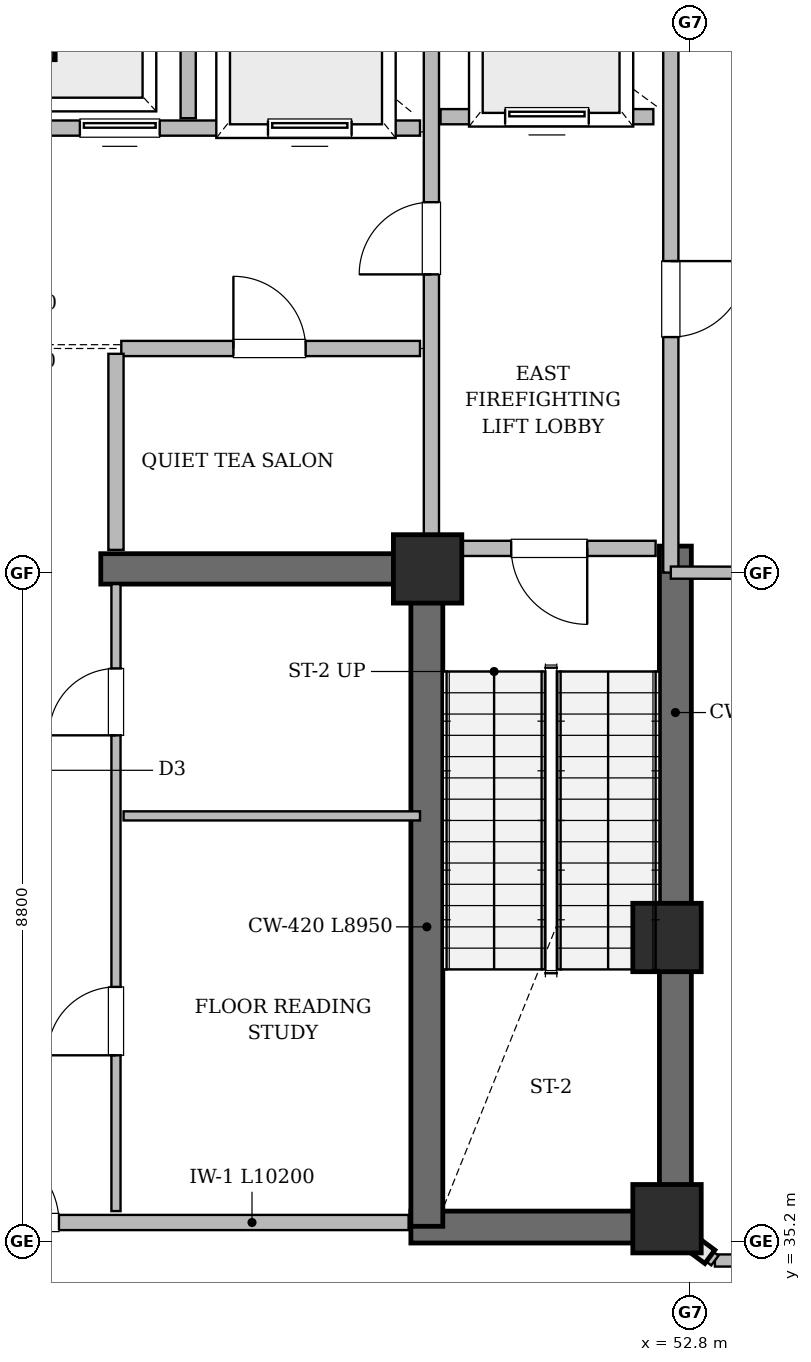
"""IFC4 building model, lengths in metres.
Left out: names, types, materials, properties, quantities, classifications, styles, units other than length and angle.
Written with IfcOpenShell. Run it as: python <this file> out.ifc"""

import sys

from ifc_helpers import new_model, si_unit, direction, frame, frame_2d, origin, origin_2d, place, context, subcontext, project, spatial, rectangle, extrude, element, fill, save


model = new_model("IFC4")
c1 = context("Model", 3, precision=1e-05, world=origin(), true_north=direction((0.0, 1.0)))
c2 = subcontext(c1, "Body", "Model", "MODEL_VIEW")
j1 = project(units=[si_unit("LENGTHUNIT", "METRE"), si_unit("PLANEANGLEUNIT", "RADIAN")], contexts=[c1])
p1 = place(None, origin())
s1 = spatial("IfcSite", under=j1, at=p1, CompositionType="ELEMENT")
p2 = place(p1, origin())
s2 = spatial("IfcBuilding", under=s1, at=p2, CompositionType="ELEMENT")
p3 = place(p2, frame((0.0, 0.0, 295.4)))
s3 = spatial("IfcBuildingStorey", under=s2, at=p3, CompositionType="ELEMENT", Elevation=295.4)
p4 = place(p3, frame((49.13, 35.39, 0.0), z_axis=(0.0, 0.0, 1.0), x_axis=(1.0, 0.0, 0.0)))
e1 = element("IfcWall", 1, at=p4, inside=s3, PredefinedType="SHEAR", context=c2, shape_type="SweptSolid", body=[
    extrude(rectangle(XDim=3.69, YDim=0.42, at=frame_2d((1.845, 0.0))), origin(), (0.0, 0.0, 1.0), 5.14),
])
p5 = place(p3, frame((52.61, 35.18, 0.0), z_axis=(0.0, 0.0, 1.0), x_axis=(0.0, 1.0, 0.0)))
e2 = element("IfcWall", 2, at=p5, inside=s3, PredefinedType="SHEAR", context=c2, shape_type="SweptSolid", body=[
    extrude(rectangle(XDim=9.17, YDim=0.42, at=frame_2d((4.585, 0.0))), origin(), (0.0, 0.0, 1.0), 5.14),
])
p6 = place(p3, frame((49.34, 35.4, 0.0), z_axis=(0.0, 0.0, 1.0), x_axis=(0.0, 1.0, 0.0)))
e3 = element("IfcWall", 3, at=p6, inside=s3, PredefinedType="SHEAR", context=c2, shape_type="SweptSolid", body=[
    extrude(rectangle(XDim=8.95, YDim=0.42, at=frame_2d((4.475, 0.0))), origin(), (0.0, 0.0, 1.0), 5.14),
])
p7 = place(p3, frame((45.05, 44.05, 0.0), z_axis=(0.0, 0.0, 1.0), x_axis=(1.0, 0.0, 0.0)))
e4 = element("IfcWall", 4, at=p7, inside=s3, PredefinedType="SHEAR", context=c2, shape_type="SweptSolid", body=[
    extrude(rectangle(XDim=4.2, YDim=0.4, at=frame_2d((2.1, 0.0))), origin(), (0.0, 0.0, 1.0), 5.14),
])
for number, where, z_axis, x_axis in (
    (5, (52.5, 35.5, 0.0), (0.0, 0.0, 1.0), (1.0, 0.0, 0.0)),
    (6, (52.5, 39.2, 0.0), (0.0, 0.0, 1.0), (1.0, 0.0, 0.0)),
    (7, (49.35, 44.05, 0.0), (0.0, 0.0, 1.0), (1.0, 0.0, 0.0)),
    (8, (44.0, 51.2, 0.0), (0.0, 0.0, 1.0), (1.0, 0.0, 0.0)),
):
    element("IfcColumn", number, at=place(p3, frame(where, z_axis=z_axis, x_axis=x_axis)), inside=s3, PredefinedType="COLUMN", context=c2, shape_type="SweptSolid", body=[
        extrude(rectangle(XDim=0.9, YDim=0.9, at=origin_2d()), origin(), (0.0, 0.0, 1.0), 5.4),
    ])
p8 = place(p3, frame((38.9, 35.45, 0.0), z_axis=(0.0, 0.0, 1.0), x_axis=(1.0, 0.0, 0.0)))
e9 = element("IfcWall", 9, at=p8, inside=s3, PredefinedType="SOLIDWALL", context=c2, shape_type="SweptSolid", body=[
    extrude(rectangle(XDim=10.2, YDim=0.2, at=frame_2d((5.1, 0.0))), origin(), (0.0, 0.0, 1.0), 5.14),
])
p9 = place(p8, frame((4.6, 0.0, 0.0)))
e10 = element("IfcOpeningElement", 10, at=p9, cuts=e9, PredefinedType="OPENING", context=c2, shape_type="SweptSolid", body=[
    extrude(rectangle(XDim=1.0, YDim=2.15, at=frame_2d((0.5, 1.075))), frame((0.0, 0.11, 0.0), z_axis=(0.0, -1.0, 0.0), x_axis=(1.0, 0.0, 0.0)), (0.0, 0.0, 1.0), 0.22),
])
p10 = place(p3, frame((52.55, 44.001, 0.0), z_axis=(0.0, 0.0, 1.0), x_axis=(0.0, 1.0, 0.0)))
e11 = element("IfcWall", 11, at=p10, inside=s3, PredefinedType="SOLIDWALL", context=c2, shape_type="SweptSolid", body=[
    extrude(rectangle(XDim=8.419, YDim=0.2, at=frame_2d((4.209, 0.0))), origin(), (0.0, 0.0, 1.0), 5.14),
])
p11 = place(p10, frame((3.099, 0.0, 0.0)))
e12 = element("IfcOpeningElement", 12, at=p11, cuts=e11, PredefinedType="OPENING", context=c2, shape_type="SweptSolid", body=[
    extrude(rectangle(XDim=1.0, YDim=2.15, at=frame_2d((0.5, 1.075))), frame((0.0, 0.11, 0.0), z_axis=(0.0, -1.0, 0.0), x_axis=(1.0, 0.0, 0.0)), (0.0, 0.0, 1.0), 0.22),
])
p12 = place(p3, frame((45.25, 35.6, 0.0), z_axis=(0.0, 0.0, 1.0), x_axis=(0.0, 1.0, 0.0)))
e13 = element("IfcWall", 13, at=p12, inside=s3, PredefinedType="PARTITIONING", context=c2, shape_type="SweptSolid", body=[
    extrude(rectangle(XDim=8.25, YDim=0.12, at=frame_2d((4.125, 0.0))), origin(), (0.0, 0.0, 1.0), 5.14),
])
p13 = place(p12, frame((2.05, 0.0, 0.0)))
e14 = element("IfcOpeningElement", 14, at=p13, cuts=e13, PredefinedType="OPENING", context=c2, shape_type="SweptSolid", body=[
    extrude(rectangle(XDim=0.9, YDim=2.1, at=frame_2d((0.45, 1.05))), frame((0.0, 0.07, 0.0), z_axis=(0.0, -1.0, 0.0), x_axis=(1.0, 0.0, 0.0)), (0.0, 0.0, 1.0), 0.14),
])
p14 = place(p12, frame((6.26, 0.0, 0.0)))
e15 = element("IfcOpeningElement", 15, at=p14, cuts=e13, PredefinedType="OPENING", context=c2, shape_type="SweptSolid", body=[
    extrude(rectangle(XDim=0.88, YDim=2.1, at=frame_2d((0.44, 1.05))), frame((0.0, 0.07, 0.0), z_axis=(0.0, -1.0, 0.0), x_axis=(1.0, 0.0, 0.0)), (0.0, 0.0, 1.0), 0.14),
])
p15 = place(p3, frame((49.4, 44.5, 0.0), z_axis=(0.0, 0.0, 1.0), x_axis=(0.0, 1.0, 0.0)))
e16 = element("IfcWall", 16, at=p15, inside=s3, PredefinedType="SOLIDWALL", context=c2, shape_type="SweptSolid", body=[
    extrude(rectangle(XDim=7.92, YDim=0.2, at=frame_2d((3.96, 0.0))), origin(), (0.0, 0.0, 1.0), 4.228),
])
p16 = place(p15, frame((3.425, 0.0, 0.0)))
e17 = element("IfcOpeningElement", 17, at=p16, cuts=e16, PredefinedType="OPENING", context=c2, shape_type="SweptSolid", body=[
    extrude(rectangle(XDim=0.95, YDim=2.15, at=frame_2d((0.475, 1.075))), frame((0.0, 0.11, 0.0), z_axis=(0.0, -1.0, 0.0), x_axis=(1.0, 0.0, 0.0)), (0.0, 0.0, 1.0), 0.22),
])
p17 = place(p3, frame((44.25, 49.85, 0.0), z_axis=(0.0, 0.0, 1.0), x_axis=(1.0, 0.0, 0.0)))
e18 = element("IfcWall", 18, at=p17, inside=s3, PredefinedType="SOLIDWALL", context=c2, shape_type="SweptSolid", body=[
    extrude(rectangle(XDim=5.0, YDim=0.2, at=frame_2d((2.5, 0.0))), origin(), (0.0, 0.0, 1.0), 4.228),
])
p18 = place(p17, frame((0.525, 0.0, 0.0)))
e19 = element("IfcOpeningElement", 19, at=p18, cuts=e18, PredefinedType="OPENING", context=c2, shape_type="SweptSolid", body=[
    extrude(rectangle(XDim=1.05, YDim=2.15, at=frame_2d((0.525, 1.075))), frame((0.0, 0.11, 0.0), z_axis=(0.0, -1.0, 0.0), x_axis=(1.0, 0.0, 0.0)), (0.0, 0.0, 1.0), 0.22),
])
p19 = place(p17, frame((3.0, 0.0, 0.0)))
e20 = element("IfcOpeningElement", 20, at=p19, cuts=e18, PredefinedType="OPENING", context=c2, shape_type="SweptSolid", body=[
    extrude(rectangle(XDim=1.1, YDim=2.15, at=frame_2d((0.55, 1.075))), frame((0.0, 0.11, 0.0), z_axis=(0.0, -1.0, 0.0), x_axis=(1.0, 0.0, 0.0)), (0.0, 0.0, 1.0), 0.22),
])
p20 = place(p3, frame((45.32, 46.95, 0.0), z_axis=(0.0, 0.0, 1.0), x_axis=(1.0, 0.0, 0.0)))
e21 = element("IfcWall", 21, at=p20, inside=s3, PredefinedType="SOLIDWALL", context=c2, shape_type="SweptSolid", body=[
    extrude(rectangle(XDim=3.93, YDim=0.2, at=frame_2d((1.965, 0.0))), origin(), (0.0, 0.0, 1.0), 4.228),
])
p21 = place(p20, frame((1.475, 0.0, 0.0)))
e22 = element("IfcOpeningElement", 22, at=p21, cuts=e21, PredefinedType="OPENING", context=c2, shape_type="SweptSolid", body=[
    extrude(rectangle(XDim=0.95, YDim=2.1, at=frame_2d((0.475, 1.05))), frame((0.0, 0.11, 0.0), z_axis=(0.0, -1.0, 0.0), x_axis=(1.0, 0.0, 0.0)), (0.0, 0.0, 1.0), 0.22),
])
p22 = place(p3, frame((49.55, 44.32, 0.0), z_axis=(0.0, 0.0, 1.0), x_axis=(1.0, 0.0, 0.0)))
e23 = element("IfcWall", 23, at=p22, inside=s3, PredefinedType="SOLIDWALL", context=c2, shape_type="SweptSolid", body=[
    extrude(rectangle(XDim=2.8, YDim=0.2, at=frame_2d((1.4, 0.0))), origin(), (0.0, 0.0, 1.0), 4.228),
])
p23 = place(p22, frame((0.9, 0.0, 0.0)))
e24 = element("IfcOpeningElement", 24, at=p23, cuts=e23, PredefinedType="OPENING", context=c2, shape_type="SweptSolid", body=[
    extrude(rectangle(XDim=1.0, YDim=2.15, at=frame_2d((0.5, 1.075))), frame((0.0, 0.11, 0.0), z_axis=(0.0, -1.0, 0.0), x_axis=(1.0, 0.0, 0.0)), (0.0, 0.0, 1.0), 0.22),
])
p24 = place(p3, frame((49.52, 50.0, 0.0), z_axis=(0.0, 0.0, 1.0), x_axis=(1.0, 0.0, 0.0)))
e25 = element("IfcWall", 25, at=p24, inside=s3, PredefinedType="SOLIDWALL", context=c2, shape_type="SweptSolid", body=[
    extrude(rectangle(XDim=2.8, YDim=0.2, at=frame_2d((1.4, 0.0))), origin(), (0.0, 0.0, 1.0), 5.14),
])
p25 = place(p24, frame((0.85, 0.0, 0.0)))
e26 = element("IfcOpeningElement", 26, at=p25, cuts=e25, PredefinedType="OPENING", context=c2, shape_type="SweptSolid", body=[
    extrude(rectangle(XDim=1.1, YDim=2.15, at=frame_2d((0.55, 1.075))), frame((0.0, 0.11, 0.0), z_axis=(0.0, -1.0, 0.0), x_axis=(1.0, 0.0, 0.0)), (0.0, 0.0, 1.0), 0.22),
])
p26 = place(p3, frame((60.335, 43.985, 0.0), z_axis=(0.0, 0.0, 1.0), x_axis=(-0.999997857952, 0.002069804579, 0.0)))
e27 = element("IfcWall", 27, at=p26, inside=s3, PredefinedType="SOLIDWALL", context=c2, shape_type="SweptSolid", body=[
    extrude(rectangle(XDim=7.785, YDim=0.16, at=frame_2d((3.893, 0.0))), origin(), (0.0, 0.0, 1.0), 4.54),
])
p27 = place(p3, frame((45.35, 40.8, 0.0), z_axis=(0.0, 0.0, 1.0), x_axis=(1.0, 0.0, 0.0)))
e28 = element("IfcWall", 28, at=p27, inside=s3, PredefinedType="PARTITIONING", context=c2, shape_type="SweptSolid", body=[
    extrude(rectangle(XDim=3.9, YDim=0.12, at=frame_2d((1.95, 0.0))), origin(), (0.0, 0.0, 1.0), 5.14),
])
p28 = place(p3, frame((45.25, 44.3, 0.0), z_axis=(0.0, 0.0, 1.0), x_axis=(0.0, 1.0, 0.0)))
e29 = element("IfcWall", 29, at=p28, inside=s3, PredefinedType="SOLIDWALL", context=c2, shape_type="SweptSolid", body=[
    extrude(rectangle(XDim=2.58, YDim=0.2, at=frame_2d((1.29, 0.0))), origin(), (0.0, 0.0, 1.0), 5.14),
])
p29 = place(p3, frame((46.2, 49.98, 0.0), z_axis=(0.0, 0.0, 1.0), x_axis=(0.0, 1.0, 0.0)))
e30 = element("IfcWall", 30, at=p29, inside=s3, PredefinedType="SOLIDWALL", context=c2, shape_type="SweptSolid", body=[
    extrude(rectangle(XDim=2.37, YDim=0.2, at=frame_2d((1.185, 0.0))), origin(), (0.0, 0.0, 1.0), 5.14),
])
p30 = place(p3, frame((54.52, 34.95, 0.0), z_axis=(0.0, 0.0, 1.0), x_axis=(-1.0, 0.0, 0.0)))
e31 = element("IfcWall", 31, at=p30, inside=s3, PredefinedType="SOLIDWALL", context=c2, shape_type="SweptSolid", body=[
    extrude(rectangle(XDim=1.39, YDim=0.16, at=frame_2d((0.695, 0.0))), origin(), (0.0, 0.0, 1.0), 4.54),
])
p31 = place(p3, frame((53.13, 34.95, 0.0), z_axis=(0.0, 0.0, 1.0), x_axis=(-0.802951496235, 0.596044373092, 0.0)))
e32 = element("IfcWall", 32, at=p31, inside=s3, PredefinedType="SOLIDWALL", context=c2, shape_type="SweptSolid", body=[
    extrude(rectangle(XDim=0.386, YDim=0.16, at=frame_2d((0.193, 0.0))), origin(), (0.0, 0.0, 1.0), 5.14),
])
p32 = place(p23, frame((1.0, 0.0, 0.0), z_axis=(0.0, 0.0, 1.0), x_axis=(-1.0, 0.0, 0.0)))
e33 = element("IfcDoor", 33, at=p32, inside=s3, OperationType="SINGLE_SWING_RIGHT", PredefinedType="DOOR", context=c2, shape_type="SweptSolid", body=[
    extrude(rectangle(XDim=1.0, YDim=2.15, at=frame_2d((0.5, 1.075))), frame((0.0, 0.025, 0.0), z_axis=(0.0, -1.0, 0.0), x_axis=(1.0, 0.0, 0.0)), (0.0, 0.0, 1.0), 0.05),
])
fill(e24, e33)
p33 = place(p11, frame((1.0, 0.0, 0.0), z_axis=(0.0, 0.0, 1.0), x_axis=(-1.0, 0.0, 0.0)))
e34 = element("IfcDoor", 34, at=p33, inside=s3, OperationType="SINGLE_SWING_RIGHT", PredefinedType="DOOR", context=c2, shape_type="SweptSolid", body=[
    extrude(rectangle(XDim=1.0, YDim=2.15, at=frame_2d((0.5, 1.075))), frame((0.0, 0.025, 0.0), z_axis=(0.0, -1.0, 0.0), x_axis=(1.0, 0.0, 0.0)), (0.0, 0.0, 1.0), 0.05),
])
fill(e12, e34)
p34 = place(p16, origin())
e35 = element("IfcDoor", 35, at=p34, inside=s3, OperationType="SINGLE_SWING_LEFT", PredefinedType="DOOR", context=c2, shape_type="SweptSolid", body=[
    extrude(rectangle(XDim=0.95, YDim=2.15, at=frame_2d((0.475, 1.075))), frame((0.0, 0.025, 0.0), z_axis=(0.0, -1.0, 0.0), x_axis=(1.0, 0.0, 0.0)), (0.0, 0.0, 1.0), 0.05),
])
fill(e17, e35)
p35 = place(p25, origin())
e36 = element("IfcDoor", 36, at=p35, inside=s3, OperationType="SLIDING_TO_LEFT", PredefinedType="DOOR", context=c2, shape_type="SweptSolid", body=[
    extrude(rectangle(XDim=1.1, YDim=2.15, at=frame_2d((0.55, 1.075))), frame((0.0, 0.025, 0.0), z_axis=(0.0, -1.0, 0.0), x_axis=(1.0, 0.0, 0.0)), (0.0, 0.0, 1.0), 0.05),
])
fill(e26, e36)
p36 = place(p9, origin())
e37 = element("IfcDoor", 37, at=p36, inside=s3, OperationType="SINGLE_SWING_LEFT", PredefinedType="DOOR", context=c2, shape_type="SweptSolid", body=[
    extrude(rectangle(XDim=1.0, YDim=2.15, at=frame_2d((0.5, 1.075))), frame((0.0, 0.025, 0.0), z_axis=(0.0, -1.0, 0.0), x_axis=(1.0, 0.0, 0.0)), (0.0, 0.0, 1.0), 0.05),
])
fill(e10, e37)
p37 = place(p18, origin())
e38 = element("IfcDoor", 38, at=p37, inside=s3, OperationType="SLIDING_TO_LEFT", PredefinedType="DOOR", context=c2, shape_type="SweptSolid", body=[
    extrude(rectangle(XDim=1.05, YDim=2.15, at=frame_2d((0.525, 1.075))), frame((0.0, 0.025, 0.0), z_axis=(0.0, -1.0, 0.0), x_axis=(1.0, 0.0, 0.0)), (0.0, 0.0, 1.0), 0.05),
])
fill(e19, e38)
p38 = place(p19, origin())
e39 = element("IfcDoor", 39, at=p38, inside=s3, OperationType="SLIDING_TO_LEFT", PredefinedType="DOOR", context=c2, shape_type="SweptSolid", body=[
    extrude(rectangle(XDim=1.1, YDim=2.15, at=frame_2d((0.55, 1.075))), frame((0.0, 0.025, 0.0), z_axis=(0.0, -1.0, 0.0), x_axis=(1.0, 0.0, 0.0)), (0.0, 0.0, 1.0), 0.05),
])
fill(e20, e39)
p39 = place(p21, origin())
e40 = element("IfcDoor", 40, at=p39, inside=s3, OperationType="SINGLE_SWING_LEFT", PredefinedType="DOOR", context=c2, shape_type="SweptSolid", body=[
    extrude(rectangle(XDim=0.95, YDim=2.1, at=frame_2d((0.475, 1.05))), frame((0.0, 0.025, 0.0), z_axis=(0.0, -1.0, 0.0), x_axis=(1.0, 0.0, 0.0)), (0.0, 0.0, 1.0), 0.05),
])
fill(e22, e40)
p40 = place(p13, origin())
e41 = element("IfcDoor", 41, at=p40, inside=s3, OperationType="SINGLE_SWING_LEFT", PredefinedType="DOOR", context=c2, shape_type="SweptSolid", body=[
    extrude(rectangle(XDim=0.9, YDim=2.1, at=frame_2d((0.45, 1.05))), frame((0.0, 0.025, 0.0), z_axis=(0.0, -1.0, 0.0), x_axis=(1.0, 0.0, 0.0)), (0.0, 0.0, 1.0), 0.05),
])
fill(e14, e41)
p41 = place(p14, origin())
e42 = element("IfcDoor", 42, at=p41, inside=s3, OperationType="SINGLE_SWING_LEFT", PredefinedType="DOOR", context=c2, shape_type="SweptSolid", body=[
    extrude(rectangle(XDim=0.88, YDim=2.1, at=frame_2d((0.44, 1.05))), frame((0.0, 0.025, 0.0), z_axis=(0.0, -1.0, 0.0), x_axis=(1.0, 0.0, 0.0)), (0.0, 0.0, 1.0), 0.05),
])
fill(e15, e42)
save(model, sys.argv[1])
